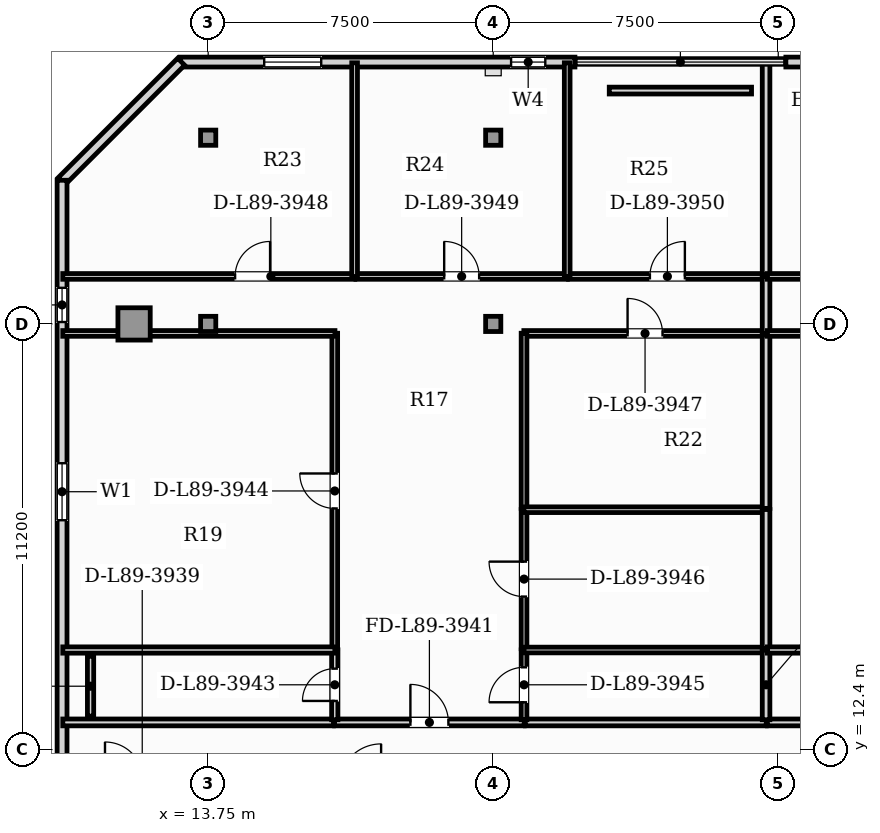
"""IFC4 building model, lengths in metres.
Left out: names, types, materials, properties, quantities, classifications, styles, units other than length and angle.
Written with IfcOpenShell. Run it as: python <this file> out.ifc"""

import sys

from ifc_helpers import new_model, si_unit, direction, frame, frame_2d, origin, origin_2d, place, context, subcontext, project, spatial, rectangle, hollow_rectangle, extrude, element, fill, save


model = new_model("IFC4")
c1 = context("Model", 3, precision=1e-05, world=origin(), true_north=direction((0.0, 1.0)))
c2 = subcontext(c1, "Body", "Model", "MODEL_VIEW")
j1 = project(units=[si_unit("LENGTHUNIT", "METRE"), si_unit("PLANEANGLEUNIT", "RADIAN")], contexts=[c1])
p1 = place(None, origin())
s1 = spatial("IfcSite", under=j1, at=p1, CompositionType="ELEMENT")
p2 = place(p1, origin())
s2 = spatial("IfcBuilding", under=s1, at=p2, CompositionType="ELEMENT")
p3 = place(p2, frame((0.0, 0.0, 362.25)))
s3 = spatial("IfcBuildingStorey", under=s2, at=p3, CompositionType="ELEMENT", Elevation=362.25)
p4 = place(p3, frame((11.8, 23.6, 0.0), z_axis=(0.0, 0.0, 1.0), x_axis=(1.0, 0.0, 0.0)))
e1 = element("IfcColumn", 1, at=p4, inside=s3, PredefinedType="USERDEFINED", context=c2, shape_type="SweptSolid", body=[
    extrude(hollow_rectangle(XDim=0.85, YDim=0.85, WallThickness=0.05, at=origin_2d()), origin(), (0.0, 0.0, 1.0), 4.35),
])
for number, where, z_axis, x_axis in (
    (2, (13.75, 23.6, 0.0), (0.0, 0.0, 1.0), (1.0, 0.0, 0.0)),
    (3, (21.25, 23.6, 0.0), (0.0, 0.0, 1.0), (1.0, 0.0, 0.0)),
    (4, (13.75, 28.5, 0.0), (0.0, 0.0, 1.0), (1.0, 0.0, 0.0)),
    (5, (21.25, 28.5, 0.0), (0.0, 0.0, 1.0), (1.0, 0.0, 0.0)),
):
    element("IfcColumn", number, at=place(p3, frame(where, z_axis=z_axis, x_axis=x_axis)), inside=s3, PredefinedType="COLUMN", context=c2, shape_type="SweptSolid", body=[
        extrude(hollow_rectangle(XDim=0.4, YDim=0.4, WallThickness=0.02, at=origin_2d()), origin(), (0.0, 0.0, 1.0), 4.35),
    ])
p5 = place(p3, frame((30.25, 30.49, 0.0), z_axis=(0.0, 0.0, 1.0), x_axis=(-1.0, 0.0, 0.0)))
e6 = element("IfcWall", 6, at=p5, inside=s3, PredefinedType="SOLIDWALL", context=c2, shape_type="SweptSolid", body=[
    extrude(rectangle(XDim=1.3, YDim=0.26, at=frame_2d((0.65, 0.0))), origin(), (0.0, 0.0, 1.0), 4.1),
])
p6 = place(p3, frame((23.4, 30.49, 0.0), z_axis=(0.0, 0.0, 1.0), x_axis=(-1.0, 0.0, 0.0)))
e7 = element("IfcWall", 7, at=p6, inside=s3, PredefinedType="SOLIDWALL", context=c2, shape_type="SweptSolid", body=[
    extrude(rectangle(XDim=10.385, YDim=0.26, at=frame_2d((5.192, 0.0))), origin(), (0.0, 0.0, 1.0), 4.1),
])
p7 = place(p6, frame((6.676, 0.0, 0.9)))
e8 = element("IfcOpeningElement", 8, at=p7, cuts=e7, PredefinedType="OPENING", context=c2, shape_type="SweptSolid", body=[
    extrude(rectangle(XDim=1.5, YDim=1.95, at=frame_2d((0.75, 0.975))), frame((0.0, 0.14, 0.0), z_axis=(0.0, -1.0, 0.0), x_axis=(1.0, 0.0, 0.0)), (0.0, 0.0, 1.0), 0.28),
])
p8 = place(p6, frame((0.78, 0.0, 0.95)))
e9 = element("IfcOpeningElement", 9, at=p8, cuts=e7, PredefinedType="OPENING", context=c2, shape_type="SweptSolid", body=[
    extrude(rectangle(XDim=0.9, YDim=1.5, at=frame_2d((0.45, 0.75))), frame((0.0, 0.14, 0.0), z_axis=(0.0, -1.0, 0.0), x_axis=(1.0, 0.0, 0.0)), (0.0, 0.0, 1.0), 0.28),
])
p9 = place(p3, frame((13.039, 30.5, 0.0), z_axis=(0.0, 0.0, 1.0), x_axis=(-0.707106781187, -0.707106781187, 0.0)))
e10 = element("IfcWall", 10, at=p9, inside=s3, PredefinedType="SOLIDWALL", context=c2, shape_type="SweptSolid", body=[
    extrude(rectangle(XDim=4.445, YDim=0.26, at=frame_2d((2.223, 0.0))), origin(), (0.0, 0.0, 1.0), 4.1),
])
p10 = place(p3, frame((9.905, 27.38, 0.0), z_axis=(0.0, 0.0, 1.0), x_axis=(0.0, -1.0, 0.0)))
e11 = element("IfcWall", 11, at=p10, inside=s3, PredefinedType="SOLIDWALL", context=c2, shape_type="SweptSolid", body=[
    extrude(rectangle(XDim=24.14, YDim=0.26, at=frame_2d((12.07, 0.0))), origin(), (0.0, 0.0, 1.0), 4.1),
])
p11 = place(p10, frame((21.27, 0.0, 0.85)))
e12 = element("IfcOpeningElement", 12, at=p11, cuts=e11, PredefinedType="OPENING", context=c2, shape_type="SweptSolid", body=[
    extrude(rectangle(XDim=2.1, YDim=2.05, at=frame_2d((1.05, 1.025))), frame((0.0, 0.14, 0.0), z_axis=(0.0, -1.0, 0.0), x_axis=(1.0, 0.0, 0.0)), (0.0, 0.0, 1.0), 0.28),
])
p12 = place(p10, frame((2.83, 0.0, 0.95)))
e13 = element("IfcOpeningElement", 13, at=p12, cuts=e11, PredefinedType="OPENING", context=c2, shape_type="SweptSolid", body=[
    extrude(rectangle(XDim=0.9, YDim=1.5, at=frame_2d((0.45, 0.75))), frame((0.0, 0.14, 0.0), z_axis=(0.0, -1.0, 0.0), x_axis=(1.0, 0.0, 0.0)), (0.0, 0.0, 1.0), 0.28),
])
p13 = place(p10, frame((7.445, 0.0, 0.9)))
e14 = element("IfcOpeningElement", 14, at=p13, cuts=e11, PredefinedType="OPENING", context=c2, shape_type="SweptSolid", body=[
    extrude(rectangle(XDim=1.5, YDim=1.95, at=frame_2d((0.75, 0.975))), frame((0.0, 0.14, 0.0), z_axis=(0.0, -1.0, 0.0), x_axis=(1.0, 0.0, 0.0)), (0.0, 0.0, 1.0), 0.28),
])
p14 = place(p3, frame((17.076, 13.115, 0.0), z_axis=(0.0, 0.0, 1.0), x_axis=(1.0, 0.0, 0.0)))
e15 = element("IfcWall", 15, at=p14, inside=s3, PredefinedType="PARTITIONING", context=c2, shape_type="SweptSolid", body=[
    extrude(rectangle(XDim=4.99, YDim=0.18, at=frame_2d((2.495, 0.0))), origin(), (0.0, 0.0, 1.0), 4.1),
])
p15 = place(p14, frame((1.995, 0.0, 0.0)))
e16 = element("IfcOpeningElement", 16, at=p15, cuts=e15, PredefinedType="OPENING", context=c2, shape_type="SweptSolid", body=[
    extrude(rectangle(XDim=1.0, YDim=2.15, at=frame_2d((0.5, 1.075))), frame((0.0, 0.1, 0.0), z_axis=(0.0, -1.0, 0.0), x_axis=(1.0, 0.0, 0.0)), (0.0, 0.0, 1.0), 0.2),
])
p16 = place(p3, frame((9.925, 13.115, 0.0), z_axis=(0.0, 0.0, 1.0), x_axis=(1.0, 0.0, 0.0)))
e17 = element("IfcWall", 17, at=p16, inside=s3, PredefinedType="PARTITIONING", context=c2, shape_type="SweptSolid", body=[
    extrude(rectangle(XDim=7.121, YDim=0.18, at=frame_2d((3.561, 0.0))), origin(), (0.0, 0.0, 1.0), 4.1),
])
p17 = place(p3, frame((22.096, 13.115, 0.0), z_axis=(0.0, 0.0, 1.0), x_axis=(1.0, 0.0, 0.0)))
e18 = element("IfcWall", 18, at=p17, inside=s3, PredefinedType="PARTITIONING", context=c2, shape_type="SweptSolid", body=[
    extrude(rectangle(XDim=6.339, YDim=0.18, at=frame_2d((3.169, 0.0))), origin(), (0.0, 0.0, 1.0), 4.1),
])
p18 = place(p3, frame((28.464, 13.115, 0.0), z_axis=(0.0, 0.0, 1.0), x_axis=(1.0, 0.0, 0.0)))
e19 = element("IfcWall", 19, at=p18, inside=s3, PredefinedType="PARTITIONING", context=c2, shape_type="SweptSolid", body=[
    extrude(rectangle(XDim=6.693, YDim=0.18, at=frame_2d((3.346, 0.0))), origin(), (0.0, 0.0, 1.0), 4.1),
])
p19 = place(p3, frame((17.081, 13.185, 0.0), z_axis=(0.0, 0.0, 1.0), x_axis=(0.0, 1.0, 0.0)))
e20 = element("IfcWall", 20, at=p19, inside=s3, PredefinedType="PLUMBINGWALL", context=c2, shape_type="SweptSolid", body=[
    extrude(rectangle(XDim=1.84, YDim=0.165, at=frame_2d((0.92, 0.0))), origin(), (0.0, 0.0, 1.0), 4.1),
])
p20 = place(p19, frame((0.495, 0.0, 0.0)))
e21 = element("IfcOpeningElement", 21, at=p20, cuts=e20, PredefinedType="OPENING", context=c2, shape_type="SweptSolid", body=[
    extrude(rectangle(XDim=0.85, YDim=2.1, at=frame_2d((0.425, 1.05))), frame((0.0, 0.093, 0.0), z_axis=(0.0, -1.0, 0.0), x_axis=(1.0, 0.0, 0.0)), (0.0, 0.0, 1.0), 0.185),
])
p21 = place(p3, frame((17.081, 15.055, 0.0), z_axis=(0.0, 0.0, 1.0), x_axis=(0.0, 1.0, 0.0)))
e22 = element("IfcWall", 22, at=p21, inside=s3, PredefinedType="PARTITIONING", context=c2, shape_type="SweptSolid", body=[
    extrude(rectangle(XDim=8.3, YDim=0.15, at=frame_2d((4.15, 0.0))), origin(), (0.0, 0.0, 1.0), 4.1),
])
p22 = place(p21, frame((3.69, 0.0, 0.0)))
e23 = element("IfcOpeningElement", 23, at=p22, cuts=e22, PredefinedType="OPENING", context=c2, shape_type="SweptSolid", body=[
    extrude(rectangle(XDim=0.92, YDim=2.1, at=frame_2d((0.46, 1.05))), frame((0.0, 0.085, 0.0), z_axis=(0.0, -1.0, 0.0), x_axis=(1.0, 0.0, 0.0)), (0.0, 0.0, 1.0), 0.17),
])
p23 = place(p3, frame((9.925, 23.35, 0.0), z_axis=(0.0, 0.0, 1.0), x_axis=(1.0, 0.0, 0.0)))
e24 = element("IfcWall", 24, at=p23, inside=s3, PredefinedType="PARTITIONING", context=c2, shape_type="SweptSolid", body=[
    extrude(rectangle(XDim=7.161, YDim=0.15, at=frame_2d((3.581, 0.0))), origin(), (0.0, 0.0, 1.0), 4.1),
])
p24 = place(p3, frame((22.061, 13.185, 0.0), z_axis=(0.0, 0.0, 1.0), x_axis=(0.0, 1.0, 0.0)))
e25 = element("IfcWall", 25, at=p24, inside=s3, PredefinedType="PARTITIONING", context=c2, shape_type="SweptSolid", body=[
    extrude(rectangle(XDim=1.84, YDim=0.15, at=frame_2d((0.92, 0.0))), origin(), (0.0, 0.0, 1.0), 4.1),
])
p25 = place(p24, frame((0.46, 0.0, 0.0)))
e26 = element("IfcOpeningElement", 26, at=p25, cuts=e25, PredefinedType="OPENING", context=c2, shape_type="SweptSolid", body=[
    extrude(rectangle(XDim=0.92, YDim=2.1, at=frame_2d((0.46, 1.05))), frame((0.0, 0.085, 0.0), z_axis=(0.0, -1.0, 0.0), x_axis=(1.0, 0.0, 0.0)), (0.0, 0.0, 1.0), 0.17),
])
p26 = place(p3, frame((22.061, 15.055, 0.0), z_axis=(0.0, 0.0, 1.0), x_axis=(0.0, 1.0, 0.0)))
e27 = element("IfcWall", 27, at=p26, inside=s3, PredefinedType="PARTITIONING", context=c2, shape_type="SweptSolid", body=[
    extrude(rectangle(XDim=3.662, YDim=0.15, at=frame_2d((1.831, 0.0))), origin(), (0.0, 0.0, 1.0), 4.1),
])
p27 = place(p26, frame((1.371, 0.0, 0.0)))
e28 = element("IfcOpeningElement", 28, at=p27, cuts=e27, PredefinedType="OPENING", context=c2, shape_type="SweptSolid", body=[
    extrude(rectangle(XDim=0.92, YDim=2.1, at=frame_2d((0.46, 1.05))), frame((0.0, 0.085, 0.0), z_axis=(0.0, -1.0, 0.0), x_axis=(1.0, 0.0, 0.0)), (0.0, 0.0, 1.0), 0.17),
])
p28 = place(p3, frame((22.056, 23.35, 0.0), z_axis=(0.0, 0.0, 1.0), x_axis=(1.0, 0.0, 0.0)))
e29 = element("IfcWall", 29, at=p28, inside=s3, PredefinedType="PARTITIONING", context=c2, shape_type="SweptSolid", body=[
    extrude(rectangle(XDim=6.379, YDim=0.15, at=frame_2d((3.189, 0.0))), origin(), (0.0, 0.0, 1.0), 3.2),
])
p29 = place(p28, frame((2.729, 0.0, 0.0)))
e30 = element("IfcOpeningElement", 30, at=p29, cuts=e29, PredefinedType="OPENING", context=c2, shape_type="SweptSolid", body=[
    extrude(rectangle(XDim=0.92, YDim=2.1, at=frame_2d((0.46, 1.05))), frame((0.0, 0.085, 0.0), z_axis=(0.0, -1.0, 0.0), x_axis=(1.0, 0.0, 0.0)), (0.0, 0.0, 1.0), 0.17),
])
p30 = place(p3, frame((22.061, 18.747, 0.0), z_axis=(0.0, 0.0, 1.0), x_axis=(0.0, 1.0, 0.0)))
e31 = element("IfcWall", 31, at=p30, inside=s3, PredefinedType="PARTITIONING", context=c2, shape_type="SweptSolid", body=[
    extrude(rectangle(XDim=4.608, YDim=0.15, at=frame_2d((2.304, 0.0))), origin(), (0.0, 0.0, 1.0), 4.1),
])
p31 = place(p3, frame((9.925, 24.85, 0.0), z_axis=(0.0, 0.0, 1.0), x_axis=(1.0, 0.0, 0.0)))
e32 = element("IfcWall", 32, at=p31, inside=s3, PredefinedType="PARTITIONING", context=c2, shape_type="SweptSolid", body=[
    extrude(rectangle(XDim=7.683, YDim=0.15, at=frame_2d((3.841, 0.0))), origin(), (0.0, 0.0, 1.0), 4.1),
])
p32 = place(p31, frame((4.534, 0.0, 0.0)))
e33 = element("IfcOpeningElement", 33, at=p32, cuts=e32, PredefinedType="OPENING", context=c2, shape_type="SweptSolid", body=[
    extrude(rectangle(XDim=0.92, YDim=2.1, at=frame_2d((0.46, 1.05))), frame((0.0, 0.085, 0.0), z_axis=(0.0, -1.0, 0.0), x_axis=(1.0, 0.0, 0.0)), (0.0, 0.0, 1.0), 0.17),
])
p33 = place(p3, frame((17.637, 24.85, 0.0), z_axis=(0.0, 0.0, 1.0), x_axis=(1.0, 0.0, 0.0)))
e34 = element("IfcWall", 34, at=p33, inside=s3, PredefinedType="PARTITIONING", context=c2, shape_type="SweptSolid", body=[
    extrude(rectangle(XDim=5.564, YDim=0.15, at=frame_2d((2.782, 0.0))), origin(), (0.0, 0.0, 1.0), 4.1),
])
p34 = place(p33, frame((2.322, 0.0, 0.0)))
e35 = element("IfcOpeningElement", 35, at=p34, cuts=e34, PredefinedType="OPENING", context=c2, shape_type="SweptSolid", body=[
    extrude(rectangle(XDim=0.92, YDim=2.1, at=frame_2d((0.46, 1.05))), frame((0.0, 0.085, 0.0), z_axis=(0.0, -1.0, 0.0), x_axis=(1.0, 0.0, 0.0)), (0.0, 0.0, 1.0), 0.17),
])
p35 = place(p3, frame((23.231, 24.85, 0.0), z_axis=(0.0, 0.0, 1.0), x_axis=(1.0, 0.0, 0.0)))
e36 = element("IfcWall", 36, at=p35, inside=s3, PredefinedType="PARTITIONING", context=c2, shape_type="SweptSolid", body=[
    extrude(rectangle(XDim=5.203, YDim=0.15, at=frame_2d((2.602, 0.0))), origin(), (0.0, 0.0, 1.0), 4.1),
])
p36 = place(p35, frame((2.142, 0.0, 0.0)))
e37 = element("IfcOpeningElement", 37, at=p36, cuts=e36, PredefinedType="OPENING", context=c2, shape_type="SweptSolid", body=[
    extrude(rectangle(XDim=0.92, YDim=2.1, at=frame_2d((0.46, 1.05))), frame((0.0, 0.085, 0.0), z_axis=(0.0, -1.0, 0.0), x_axis=(1.0, 0.0, 0.0)), (0.0, 0.0, 1.0), 0.17),
])
p37 = place(p3, frame((28.429, 23.345, 0.0), z_axis=(0.0, 0.0, 1.0), x_axis=(0.0, 1.0, 0.0)))
e38 = element("IfcWall", 38, at=p37, inside=s3, PredefinedType="PARTITIONING", context=c2, shape_type="SweptSolid", body=[
    extrude(rectangle(XDim=1.51, YDim=0.2, at=frame_2d((0.755, 0.0))), origin(), (0.0, 0.0, 1.0), 4.1),
])
p38 = place(p3, frame((9.925, 15.02, 0.0), z_axis=(0.0, 0.0, 1.0), x_axis=(1.0, 0.0, 0.0)))
e39 = element("IfcWall", 39, at=p38, inside=s3, PredefinedType="PLUMBINGWALL", context=c2, shape_type="SweptSolid", body=[
    extrude(rectangle(XDim=7.161, YDim=0.165, at=frame_2d((3.581, 0.0))), origin(), (0.0, 0.0, 1.0), 4.1),
])
p39 = place(p3, frame((22.056, 15.02, 0.0), z_axis=(0.0, 0.0, 1.0), x_axis=(1.0, 0.0, 0.0)))
e40 = element("IfcWall", 40, at=p39, inside=s3, PredefinedType="PARTITIONING", context=c2, shape_type="SweptSolid", body=[
    extrude(rectangle(XDim=6.379, YDim=0.15, at=frame_2d((3.189, 0.0))), origin(), (0.0, 0.0, 1.0), 4.1),
])
p40 = place(p3, frame((28.429, 13.185, 0.0), z_axis=(0.0, 0.0, 1.0), x_axis=(0.0, 1.0, 0.0)))
e41 = element("IfcWall", 41, at=p40, inside=s3, PredefinedType="PARTITIONING", context=c2, shape_type="SweptSolid", body=[
    extrude(rectangle(XDim=1.84, YDim=0.2, at=frame_2d((0.92, 0.0))), origin(), (0.0, 0.0, 1.0), 4.1),
])
p41 = place(p3, frame((22.056, 18.712, 0.0), z_axis=(0.0, 0.0, 1.0), x_axis=(1.0, 0.0, 0.0)))
e42 = element("IfcWall", 42, at=p41, inside=s3, PredefinedType="PARTITIONING", context=c2, shape_type="SweptSolid", body=[
    extrude(rectangle(XDim=6.379, YDim=0.15, at=frame_2d((3.189, 0.0))), origin(), (0.0, 0.0, 1.0), 4.1),
])
p42 = place(p3, frame((28.429, 15.055, 0.0), z_axis=(0.0, 0.0, 1.0), x_axis=(0.0, 1.0, 0.0)))
e43 = element("IfcWall", 43, at=p42, inside=s3, PredefinedType="PARTITIONING", context=c2, shape_type="SweptSolid", body=[
    extrude(rectangle(XDim=3.662, YDim=0.2, at=frame_2d((1.831, 0.0))), origin(), (0.0, 0.0, 1.0), 4.1),
])
p43 = place(p3, frame((28.429, 18.747, 0.0), z_axis=(0.0, 0.0, 1.0), x_axis=(0.0, 1.0, 0.0)))
e44 = element("IfcWall", 44, at=p43, inside=s3, PredefinedType="PARTITIONING", context=c2, shape_type="SweptSolid", body=[
    extrude(rectangle(XDim=4.568, YDim=0.2, at=frame_2d((2.284, 0.0))), origin(), (0.0, 0.0, 1.0), 4.1),
])
p44 = place(p3, frame((17.603, 24.845, 0.0), z_axis=(0.0, 0.0, 1.0), x_axis=(0.0, 1.0, 0.0)))
e45 = element("IfcWall", 45, at=p44, inside=s3, PredefinedType="PARTITIONING", context=c2, shape_type="SweptSolid", body=[
    extrude(rectangle(XDim=5.625, YDim=0.15, at=frame_2d((2.813, 0.0))), origin(), (0.0, 0.0, 1.0), 3.797),
])
p45 = place(p3, frame((23.196, 24.845, 0.0), z_axis=(0.0, 0.0, 1.0), x_axis=(0.0, 1.0, 0.0)))
e46 = element("IfcWall", 46, at=p45, inside=s3, PredefinedType="PARTITIONING", context=c2, shape_type="SweptSolid", body=[
    extrude(rectangle(XDim=5.625, YDim=0.15, at=frame_2d((2.813, 0.0))), origin(), (0.0, 0.0, 1.0), 4.1),
])
p46 = place(p3, frame((28.429, 24.885, 0.0), z_axis=(0.0, 0.0, 1.0), x_axis=(0.0, 1.0, 0.0)))
e47 = element("IfcWall", 47, at=p46, inside=s3, PredefinedType="PARTITIONING", context=c2, shape_type="SweptSolid", body=[
    extrude(rectangle(XDim=5.587, YDim=0.2, at=frame_2d((2.793, 0.0))), origin(), (0.0, 0.0, 1.0), 4.1),
])
p47 = place(p3, frame((28.464, 23.35, 0.0), z_axis=(0.0, 0.0, 1.0), x_axis=(1.0, 0.0, 0.0)))
e48 = element("IfcWall", 48, at=p47, inside=s3, PredefinedType="PARTITIONING", context=c2, shape_type="SweptSolid", body=[
    extrude(rectangle(XDim=6.733, YDim=0.15, at=frame_2d((3.366, 0.0))), origin(), (0.0, 0.0, 1.0), 3.2),
])
p48 = place(p3, frame((28.464, 24.85, 0.0), z_axis=(0.0, 0.0, 1.0), x_axis=(1.0, 0.0, 0.0)))
e49 = element("IfcWall", 49, at=p48, inside=s3, PredefinedType="PARTITIONING", context=c2, shape_type="SweptSolid", body=[
    extrude(rectangle(XDim=7.791, YDim=0.15, at=frame_2d((3.895, 0.0))), origin(), (0.0, 0.0, 1.0), 4.1),
])
p49 = place(p48, frame((3.435, 0.0, 0.0)))
e50 = element("IfcOpeningElement", 50, at=p49, cuts=e49, PredefinedType="OPENING", context=c2, shape_type="SweptSolid", body=[
    extrude(rectangle(XDim=0.92, YDim=2.1, at=frame_2d((0.46, 1.05))), frame((0.0, 0.085, 0.0), z_axis=(0.0, -1.0, 0.0), x_axis=(1.0, 0.0, 0.0)), (0.0, 0.0, 1.0), 0.17),
])
p50 = place(p3, frame((28.464, 15.02, 0.0), z_axis=(0.0, 0.0, 1.0), x_axis=(1.0, 0.0, 0.0)))
e51 = element("IfcWall", 51, at=p50, inside=s3, PredefinedType="PLUMBINGWALL", context=c2, shape_type="SweptSolid", body=[
    extrude(rectangle(XDim=6.733, YDim=0.165, at=frame_2d((3.366, 0.0))), origin(), (0.0, 0.0, 1.0), 4.1),
])
p51 = place(p3, frame((10.655, 13.28, 0.0), z_axis=(0.0, 0.0, 1.0), x_axis=(0.0, 1.0, 0.0)))
e52 = element("IfcWall", 52, at=p51, inside=s3, PredefinedType="PLUMBINGWALL", context=c2, shape_type="SweptSolid", body=[
    extrude(rectangle(XDim=1.575, YDim=0.165, at=frame_2d((0.788, 0.0))), origin(), (0.0, 0.0, 1.0), 4.1),
])
p52 = place(p3, frame((24.303, 29.74, 0.0), z_axis=(0.0, 0.0, 1.0), x_axis=(1.0, 0.0, 0.0)))
e53 = element("IfcWall", 53, at=p52, inside=s3, PredefinedType="PARTITIONING", context=c2, shape_type="SweptSolid", body=[
    extrude(rectangle(XDim=3.744, YDim=0.18, at=frame_2d((1.872, 0.0))), origin(), (0.0, 0.0, 1.0), 4.1),
])
p53 = place(p12, origin())
e54 = element("IfcWindow", 54, at=p53, inside=s3, PartitioningType="SINGLE_PANEL", PredefinedType="WINDOW", context=c2, shape_type="SweptSolid", body=[
    extrude(rectangle(XDim=0.9, YDim=1.5, at=frame_2d((0.45, 0.75))), frame((0.0, 0.03, 0.0), z_axis=(0.0, -1.0, 0.0), x_axis=(1.0, 0.0, 0.0)), (0.0, 0.0, 1.0), 0.06),
])
fill(e13, e54)
p54 = place(p13, origin())
e55 = element("IfcWindow", 55, at=p54, inside=s3, PartitioningType="SINGLE_PANEL", PredefinedType="WINDOW", context=c2, shape_type="SweptSolid", body=[
    extrude(rectangle(XDim=1.5, YDim=1.95, at=frame_2d((0.75, 0.975))), frame((0.0, 0.03, 0.0), z_axis=(0.0, -1.0, 0.0), x_axis=(1.0, 0.0, 0.0)), (0.0, 0.0, 1.0), 0.06),
])
fill(e14, e55)
p55 = place(p7, origin())
e56 = element("IfcWindow", 56, at=p55, inside=s3, PartitioningType="SINGLE_PANEL", PredefinedType="WINDOW", context=c2, shape_type="SweptSolid", body=[
    extrude(rectangle(XDim=1.5, YDim=1.95, at=frame_2d((0.75, 0.975))), frame((0.0, 0.03, 0.0), z_axis=(0.0, -1.0, 0.0), x_axis=(1.0, 0.0, 0.0)), (0.0, 0.0, 1.0), 0.06),
])
fill(e8, e56)
p56 = place(p8, origin())
e57 = element("IfcWindow", 57, at=p56, inside=s3, PartitioningType="SINGLE_PANEL", PredefinedType="WINDOW", context=c2, shape_type="SweptSolid", body=[
    extrude(rectangle(XDim=0.9, YDim=1.5, at=frame_2d((0.45, 0.75))), frame((0.0, 0.03, 0.0), z_axis=(0.0, -1.0, 0.0), x_axis=(1.0, 0.0, 0.0)), (0.0, 0.0, 1.0), 0.06),
])
fill(e9, e57)
p57 = place(p15, origin())
e58 = element("IfcDoor", 58, at=p57, inside=s3, OperationType="SINGLE_SWING_LEFT", PredefinedType="DOOR", context=c2, shape_type="SweptSolid", body=[
    extrude(rectangle(XDim=1.0, YDim=2.15, at=frame_2d((0.5, 1.075))), frame((0.0, 0.025, 0.0), z_axis=(0.0, -1.0, 0.0), x_axis=(1.0, 0.0, 0.0)), (0.0, 0.0, 1.0), 0.05),
])
fill(e16, e58)
p58 = place(p20, origin())
e59 = element("IfcDoor", 59, at=p58, inside=s3, OperationType="SINGLE_SWING_LEFT", PredefinedType="DOOR", context=c2, shape_type="SweptSolid", body=[
    extrude(rectangle(XDim=0.85, YDim=2.1, at=frame_2d((0.425, 1.05))), frame((0.0, 0.025, 0.0), z_axis=(0.0, -1.0, 0.0), x_axis=(1.0, 0.0, 0.0)), (0.0, 0.0, 1.0), 0.05),
])
fill(e21, e59)
p59 = place(p22, origin())
e60 = element("IfcDoor", 60, at=p59, inside=s3, OperationType="SINGLE_SWING_RIGHT", PredefinedType="DOOR", context=c2, shape_type="SweptSolid", body=[
    extrude(rectangle(XDim=0.92, YDim=2.1, at=frame_2d((0.46, 1.05))), frame((0.0, 0.025, 0.0), z_axis=(0.0, -1.0, 0.0), x_axis=(1.0, 0.0, 0.0)), (0.0, 0.0, 1.0), 0.05),
])
fill(e23, e60)
p60 = place(p25, origin())
e61 = element("IfcDoor", 61, at=p60, inside=s3, OperationType="SINGLE_SWING_LEFT", PredefinedType="DOOR", context=c2, shape_type="SweptSolid", body=[
    extrude(rectangle(XDim=0.92, YDim=2.1, at=frame_2d((0.46, 1.05))), frame((0.0, 0.025, 0.0), z_axis=(0.0, -1.0, 0.0), x_axis=(1.0, 0.0, 0.0)), (0.0, 0.0, 1.0), 0.05),
])
fill(e26, e61)
p61 = place(p27, origin())
e62 = element("IfcDoor", 62, at=p61, inside=s3, OperationType="SINGLE_SWING_RIGHT", PredefinedType="DOOR", context=c2, shape_type="SweptSolid", body=[
    extrude(rectangle(XDim=0.92, YDim=2.1, at=frame_2d((0.46, 1.05))), frame((0.0, 0.025, 0.0), z_axis=(0.0, -1.0, 0.0), x_axis=(1.0, 0.0, 0.0)), (0.0, 0.0, 1.0), 0.05),
])
fill(e28, e62)
p62 = place(p29, origin())
e63 = element("IfcDoor", 63, at=p62, inside=s3, OperationType="SINGLE_SWING_LEFT", PredefinedType="DOOR", context=c2, shape_type="SweptSolid", body=[
    extrude(rectangle(XDim=0.92, YDim=2.1, at=frame_2d((0.46, 1.05))), frame((0.0, 0.025, 0.0), z_axis=(0.0, -1.0, 0.0), x_axis=(1.0, 0.0, 0.0)), (0.0, 0.0, 1.0), 0.05),
])
fill(e30, e63)
p63 = place(p32, origin())
e64 = element("IfcDoor", 64, at=p63, inside=s3, OperationType="SINGLE_SWING_RIGHT", PredefinedType="DOOR", context=c2, shape_type="SweptSolid", body=[
    extrude(rectangle(XDim=0.92, YDim=2.1, at=frame_2d((0.46, 1.05))), frame((0.0, 0.025, 0.0), z_axis=(0.0, -1.0, 0.0), x_axis=(1.0, 0.0, 0.0)), (0.0, 0.0, 1.0), 0.05),
])
fill(e33, e64)
p64 = place(p34, origin())
e65 = element("IfcDoor", 65, at=p64, inside=s3, OperationType="SINGLE_SWING_LEFT", PredefinedType="DOOR", context=c2, shape_type="SweptSolid", body=[
    extrude(rectangle(XDim=0.92, YDim=2.1, at=frame_2d((0.46, 1.05))), frame((0.0, 0.025, 0.0), z_axis=(0.0, -1.0, 0.0), x_axis=(1.0, 0.0, 0.0)), (0.0, 0.0, 1.0), 0.05),
])
fill(e35, e65)
p65 = place(p36, origin())
e66 = element("IfcDoor", 66, at=p65, inside=s3, OperationType="SINGLE_SWING_RIGHT", PredefinedType="DOOR", context=c2, shape_type="SweptSolid", body=[
    extrude(rectangle(XDim=0.92, YDim=2.1, at=frame_2d((0.46, 1.05))), frame((0.0, 0.025, 0.0), z_axis=(0.0, -1.0, 0.0), x_axis=(1.0, 0.0, 0.0)), (0.0, 0.0, 1.0), 0.05),
])
fill(e37, e66)
save(model, sys.argv[1])
